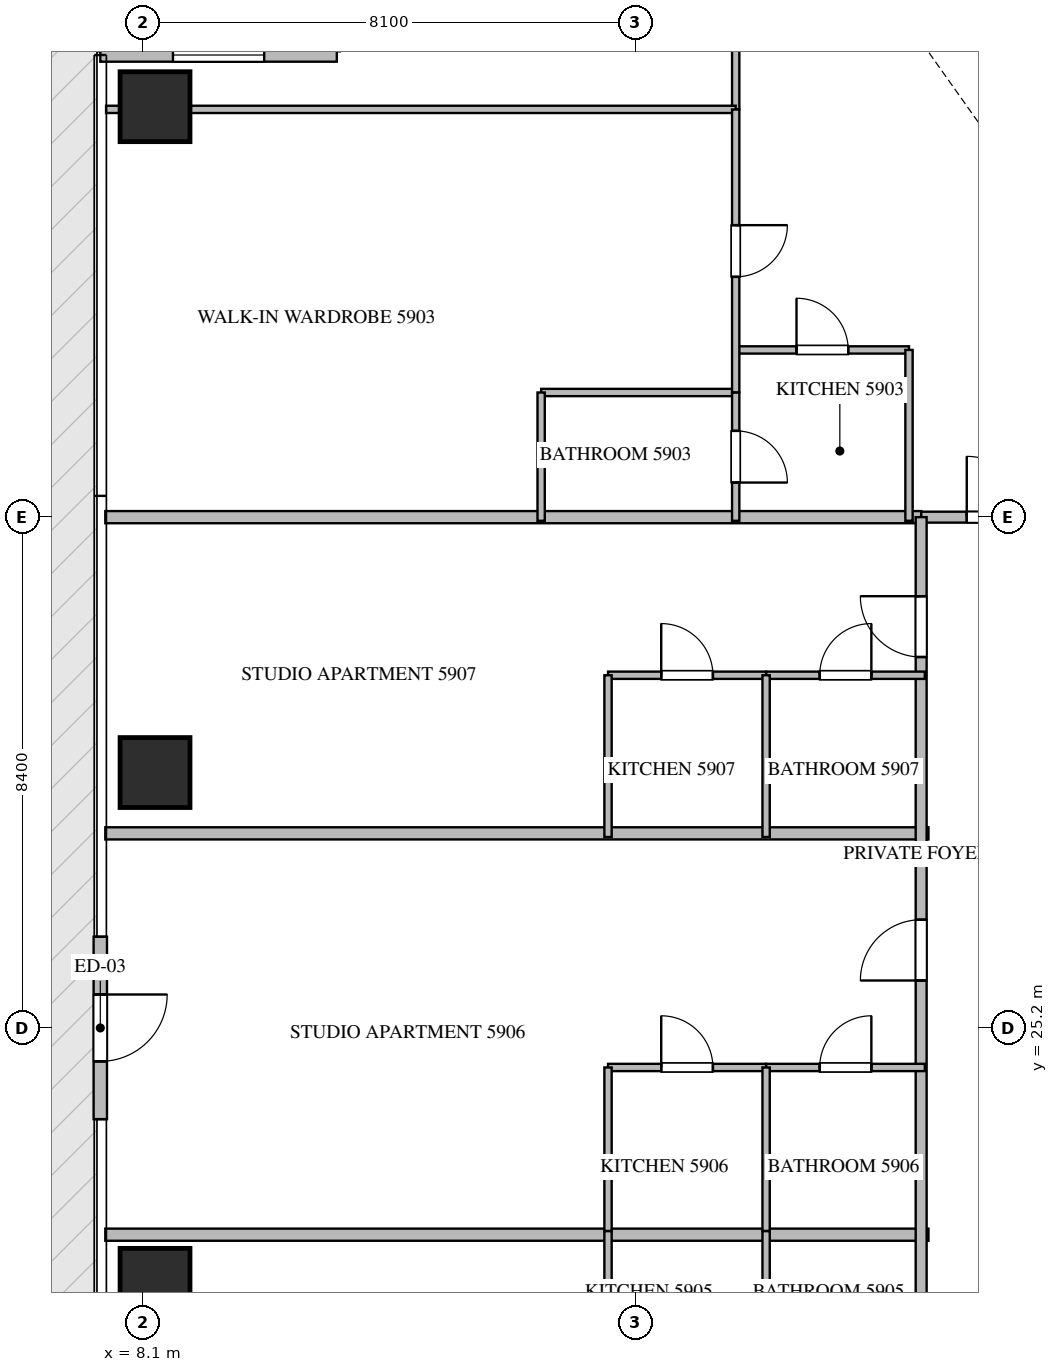
"""IFC4 building model, lengths in metres.
Left out: names, types, materials, properties, quantities, classifications, styles, units other than length and angle.
Written with IfcOpenShell. Run it as: python <this file> out.ifc"""

import sys

from ifc_helpers import new_model, si_unit, direction, frame, frame_2d, origin, origin_2d, place, context, subcontext, project, spatial, rectangle, extrude, source, transform, mapped, element, fill, save


model = new_model("IFC4")
c1 = context("Model", 3, precision=1e-05, world=origin(), true_north=direction((0.0, 1.0)))
c2 = subcontext(c1, "Body", "Model", "MODEL_VIEW")
j1 = project(units=[si_unit("LENGTHUNIT", "METRE"), si_unit("PLANEANGLEUNIT", "RADIAN")], contexts=[c1])
p1 = place(None, origin())
s1 = spatial("IfcSite", under=j1, at=p1, CompositionType="ELEMENT")
p2 = place(p1, origin())
s2 = spatial("IfcBuilding", under=s1, at=p2, CompositionType="ELEMENT")
p3 = place(p2, frame((0.0, 0.0, 237.4)))
s3 = spatial("IfcBuildingStorey", under=s2, at=p3, CompositionType="ELEMENT", Elevation=237.4)
m1 = source(origin(), c2, "Body", "SweptSolid", [
    extrude(rectangle(XDim=1.15, YDim=1.15, at=origin_2d()), origin(), (0.0, 0.0, 1.0), 3.85),
])
for number, where, z_axis, x_axis in (
    (1, (8.3, 21.0, -0.26), (0.0, 0.0, 1.0), (1.0, 0.0, 0.0)),
    (2, (8.3, 29.4, -0.26), (0.0, 0.0, 1.0), (1.0, 0.0, 0.0)),
    (3, (8.3, 40.35, -0.26), (0.0, 0.0, 1.0), (1.0, 0.0, 0.0)),
):
    element("IfcColumn", number, at=place(p3, frame(where, z_axis=z_axis, x_axis=x_axis)), inside=s3, PredefinedType="COLUMN", context=c2, shape_type="MappedRepresentation", body=[
        mapped(m1, transform((0.0, 0.0, 0.0), scale=1.0)),
    ])
p4 = place(p3, frame((11.29, 41.2, 0.0), z_axis=(0.0, 0.0, 1.0), x_axis=(-1.0, 0.0, 0.0)))
e4 = element("IfcWall", 4, at=p4, inside=s3, PredefinedType="ELEMENTEDWALL", context=c2, shape_type="SweptSolid", body=[
    extrude(rectangle(XDim=3.89, YDim=0.22, at=frame_2d((1.945, 0.0))), origin(), (0.0, 0.0, 1.0), 3.575),
])
p5 = place(p4, frame((1.195, 0.0, 0.65)))
e5 = element("IfcOpeningElement", 5, at=p5, cuts=e4, PredefinedType="OPENING", context=c2, shape_type="SweptSolid", body=[
    extrude(rectangle(XDim=1.5, YDim=2.25, at=frame_2d((0.75, 1.125))), frame((0.0, 0.12, 0.0), z_axis=(0.0, -1.0, 0.0), x_axis=(1.0, 0.0, 0.0)), (0.0, 0.0, 1.0), 0.24),
])
p6 = place(p3, frame((7.4, 26.7, 0.0), z_axis=(0.0, 0.0, 1.0), x_axis=(0.0, -1.0, 0.0)))
e6 = element("IfcWall", 6, at=p6, inside=s3, PredefinedType="ELEMENTEDWALL", context=c2, shape_type="SweptSolid", body=[
    extrude(rectangle(XDim=3.0, YDim=0.22, at=frame_2d((1.5, 0.0))), origin(), (0.0, 0.0, 1.0), 3.575),
])
p7 = place(p6, frame((0.95, 0.0, 0.0)))
e7 = element("IfcOpeningElement", 7, at=p7, cuts=e6, PredefinedType="OPENING", context=c2, shape_type="SweptSolid", body=[
    extrude(rectangle(XDim=1.1, YDim=2.2, at=frame_2d((0.55, 1.1))), frame((0.0, 0.12, 0.0), z_axis=(0.0, -1.0, 0.0), x_axis=(1.0, 0.0, 0.0)), (0.0, 0.0, 1.0), 0.24),
])
for number, where, z_axis, x_axis in (
    (8, (7.482, 21.8, 0.0), (0.0, 0.0, 1.0), (1.0, 0.0, 0.0)),
    (9, (7.482, 28.4, 0.0), (0.0, 0.0, 1.0), (1.0, 0.0, 0.0)),
):
    element("IfcWall", number, at=place(p3, frame(where, z_axis=z_axis, x_axis=x_axis)), inside=s3, PredefinedType="PARTITIONING", context=c2, shape_type="SweptSolid", body=[
        extrude(rectangle(XDim=13.538, YDim=0.2, at=frame_2d((6.769, 0.0))), origin(), (0.0, 0.0, 1.0), 3.59),
    ])
p8 = place(p3, frame((7.482, 33.6, 0.0), z_axis=(0.0, 0.0, 1.0), x_axis=(1.0, 0.0, 0.0)))
e10 = element("IfcWall", 10, at=p8, inside=s3, PredefinedType="PARTITIONING", context=c2, shape_type="SweptSolid", body=[
    extrude(rectangle(XDim=13.418, YDim=0.2, at=frame_2d((6.709, 0.0))), origin(), (0.0, 0.0, 1.0), 3.59),
])
p9 = place(p3, frame((20.902, 33.6, 0.0), z_axis=(0.0, 0.0, 1.0), x_axis=(1.0, 0.0, 0.0)))
e11 = element("IfcWall", 11, at=p9, inside=s3, PredefinedType="PARTITIONING", context=c2, shape_type="SweptSolid", body=[
    extrude(rectangle(XDim=2.496, YDim=0.18, at=frame_2d((1.248, 0.0))), origin(), (0.0, 0.0, 1.0), 3.59),
])
p10 = place(p9, frame((0.748, 0.0, 0.0)))
e12 = element("IfcOpeningElement", 12, at=p10, cuts=e11, PredefinedType="OPENING", context=c2, shape_type="SweptSolid", body=[
    extrude(rectangle(XDim=1.0, YDim=2.15, at=frame_2d((0.5, 1.075))), frame((0.0, 0.1, 0.0), z_axis=(0.0, -1.0, 0.0), x_axis=(1.0, 0.0, 0.0)), (0.0, 0.0, 1.0), 0.2),
])
p11 = place(p3, frame((20.9, 16.8, 0.0), z_axis=(0.0, 0.0, 1.0), x_axis=(0.0, 1.0, 0.0)))
e13 = element("IfcWall", 13, at=p11, inside=s3, PredefinedType="PARTITIONING", context=c2, shape_type="SweptSolid", body=[
    extrude(rectangle(XDim=16.8, YDim=0.18, at=frame_2d((8.4, 0.0))), origin(), (0.0, 0.0, 1.0), 3.59),
])
p12 = place(p11, frame((1.3, 0.0, 0.0)))
e14 = element("IfcOpeningElement", 14, at=p12, cuts=e13, PredefinedType="OPENING", context=c2, shape_type="SweptSolid", body=[
    extrude(rectangle(XDim=1.0, YDim=2.15, at=frame_2d((0.5, 1.075))), frame((0.0, 0.1, 0.0), z_axis=(0.0, -1.0, 0.0), x_axis=(1.0, 0.0, 0.0)), (0.0, 0.0, 1.0), 0.2),
])
p13 = place(p11, frame((9.18, 0.0, 0.0)))
e15 = element("IfcOpeningElement", 15, at=p13, cuts=e13, PredefinedType="OPENING", context=c2, shape_type="SweptSolid", body=[
    extrude(rectangle(XDim=1.0, YDim=2.15, at=frame_2d((0.5, 1.075))), frame((0.0, 0.1, 0.0), z_axis=(0.0, -1.0, 0.0), x_axis=(1.0, 0.0, 0.0)), (0.0, 0.0, 1.0), 0.2),
])
p14 = place(p11, frame((14.5, 0.0, 0.0)))
e16 = element("IfcOpeningElement", 16, at=p14, cuts=e13, PredefinedType="OPENING", context=c2, shape_type="SweptSolid", body=[
    extrude(rectangle(XDim=1.0, YDim=2.15, at=frame_2d((0.5, 1.075))), frame((0.0, 0.1, 0.0), z_axis=(0.0, -1.0, 0.0), x_axis=(1.0, 0.0, 0.0)), (0.0, 0.0, 1.0), 0.2),
])
p15 = place(p3, frame((17.85, 36.35, 0.0), z_axis=(0.0, 0.0, 1.0), x_axis=(1.0, 0.0, 0.0)))
e17 = element("IfcWall", 17, at=p15, inside=s3, PredefinedType="PARTITIONING", context=c2, shape_type="SweptSolid", body=[
    extrude(rectangle(XDim=2.85, YDim=0.12, at=frame_2d((1.425, 0.0))), origin(), (0.0, 0.0, 1.0), 3.59),
])
p16 = place(p15, frame((1.0, 0.0, 0.0)))
e18 = element("IfcOpeningElement", 18, at=p16, cuts=e17, PredefinedType="OPENING", context=c2, shape_type="SweptSolid", body=[
    extrude(rectangle(XDim=0.85, YDim=2.1, at=frame_2d((0.425, 1.05))), frame((0.0, 0.07, 0.0), z_axis=(0.0, -1.0, 0.0), x_axis=(1.0, 0.0, 0.0)), (0.0, 0.0, 1.0), 0.14),
])
p17 = place(p3, frame((20.7, 36.35, 0.0), z_axis=(0.0, 0.0, 1.0), x_axis=(0.0, -1.0, 0.0)))
e19 = element("IfcWall", 19, at=p17, inside=s3, PredefinedType="PARTITIONING", context=c2, shape_type="SweptSolid", body=[
    extrude(rectangle(XDim=2.81, YDim=0.12, at=frame_2d((1.405, 0.0))), origin(), (0.0, 0.0, 1.0), 3.59),
])
p18 = place(p3, frame((17.85, 49.105, 0.0), z_axis=(0.0, 0.0, 1.0), x_axis=(0.0, -1.0, 0.0)))
e20 = element("IfcWall", 20, at=p18, inside=s3, PredefinedType="PARTITIONING", context=c2, shape_type="SweptSolid", body=[
    extrude(rectangle(XDim=8.799, YDim=0.12, at=frame_2d((4.399, 0.0))), origin(), (0.0, 0.0, 1.0), 3.59),
])
p19 = place(p18, frame((4.344, 0.0, 0.0)))
e21 = element("IfcOpeningElement", 21, at=p19, cuts=e20, PredefinedType="OPENING", context=c2, shape_type="SweptSolid", body=[
    extrude(rectangle(XDim=0.9, YDim=2.1, at=frame_2d((0.45, 1.05))), frame((0.0, 0.07, 0.0), z_axis=(0.0, -1.0, 0.0), x_axis=(1.0, 0.0, 0.0)), (0.0, 0.0, 1.0), 0.14),
])
p20 = place(p3, frame((7.495, 40.306, 0.0), z_axis=(0.0, 0.0, 1.0), x_axis=(1.0, 0.0, 0.0)))
e22 = element("IfcWall", 22, at=p20, inside=s3, PredefinedType="PARTITIONING", context=c2, shape_type="SweptSolid", body=[
    extrude(rectangle(XDim=10.355, YDim=0.12, at=frame_2d((5.177, 0.0))), origin(), (0.0, 0.0, 1.0), 3.122),
])
p21 = place(p3, frame((14.65, 35.65, 0.0), z_axis=(0.0, 0.0, 1.0), x_axis=(1.0, 0.0, 0.0)))
e23 = element("IfcWall", 23, at=p21, inside=s3, PredefinedType="PARTITIONING", context=c2, shape_type="SweptSolid", body=[
    extrude(rectangle(XDim=3.2, YDim=0.12, at=frame_2d((1.6, 0.0))), origin(), (0.0, 0.0, 1.0), 3.59),
])
p22 = place(p3, frame((14.65, 35.65, 0.0), z_axis=(0.0, 0.0, 1.0), x_axis=(0.0, -1.0, 0.0)))
e24 = element("IfcWall", 24, at=p22, inside=s3, PredefinedType="PARTITIONING", context=c2, shape_type="SweptSolid", body=[
    extrude(rectangle(XDim=2.11, YDim=0.12, at=frame_2d((1.055, 0.0))), origin(), (0.0, 0.0, 1.0), 3.59),
])
p23 = place(p3, frame((17.85, 40.304, 0.0), z_axis=(0.0, 0.0, 1.0), x_axis=(0.0, -1.0, 0.0)))
e25 = element("IfcWall", 25, at=p23, inside=s3, PredefinedType="PARTITIONING", context=c2, shape_type="SweptSolid", body=[
    extrude(rectangle(XDim=4.654, YDim=0.12, at=frame_2d((2.327, 0.0))), origin(), (0.0, 0.0, 1.0), 3.59),
])
p24 = place(p23, frame((1.902, 0.0, 0.0)))
e26 = element("IfcOpeningElement", 26, at=p24, cuts=e25, PredefinedType="OPENING", context=c2, shape_type="SweptSolid", body=[
    extrude(rectangle(XDim=0.85, YDim=2.1, at=frame_2d((0.425, 1.05))), frame((0.0, 0.07, 0.0), z_axis=(0.0, -1.0, 0.0), x_axis=(1.0, 0.0, 0.0)), (0.0, 0.0, 1.0), 0.14),
])
p25 = place(p3, frame((17.85, 35.648, 0.0), z_axis=(0.0, 0.0, 1.0), x_axis=(0.0, -1.0, 0.0)))
e27 = element("IfcWall", 27, at=p25, inside=s3, PredefinedType="PARTITIONING", context=c2, shape_type="SweptSolid", body=[
    extrude(rectangle(XDim=2.108, YDim=0.12, at=frame_2d((1.054, 0.0))), origin(), (0.0, 0.0, 1.0), 3.59),
])
p26 = place(p25, frame((0.629, 0.0, 0.0)))
e28 = element("IfcOpeningElement", 28, at=p26, cuts=e27, PredefinedType="OPENING", context=c2, shape_type="SweptSolid", body=[
    extrude(rectangle(XDim=0.85, YDim=2.1, at=frame_2d((0.425, 1.05))), frame((0.0, 0.07, 0.0), z_axis=(0.0, -1.0, 0.0), x_axis=(1.0, 0.0, 0.0)), (0.0, 0.0, 1.0), 0.14),
])
for number, where, z_axis, x_axis in (
    (29, (18.35, 19.4, 0.0), (0.0, 0.0, 1.0), (0.0, 1.0, 0.0)),
    (30, (15.75, 19.4, 0.0), (0.0, 0.0, 1.0), (0.0, 1.0, 0.0)),
):
    element("IfcWall", number, at=place(p3, frame(where, z_axis=z_axis, x_axis=x_axis)), inside=s3, PredefinedType="PARTITIONING", context=c2, shape_type="SweptSolid", body=[
        extrude(rectangle(XDim=2.46, YDim=0.12, at=frame_2d((1.23, 0.0))), origin(), (0.0, 0.0, 1.0), 3.59),
    ])
p27 = place(p3, frame((15.75, 24.55, 0.0), z_axis=(0.0, 0.0, 1.0), x_axis=(1.0, 0.0, 0.0)))
e31 = element("IfcWall", 31, at=p27, inside=s3, PredefinedType="PARTITIONING", context=c2, shape_type="SweptSolid", body=[
    extrude(rectangle(XDim=2.6, YDim=0.12, at=frame_2d((1.3, 0.0))), origin(), (0.0, 0.0, 1.0), 3.59),
])
p28 = place(p27, frame((0.875, 0.0, 0.0)))
e32 = element("IfcOpeningElement", 32, at=p28, cuts=e31, PredefinedType="OPENING", context=c2, shape_type="SweptSolid", body=[
    extrude(rectangle(XDim=0.85, YDim=2.1, at=frame_2d((0.425, 1.05))), frame((0.0, 0.07, 0.0), z_axis=(0.0, -1.0, 0.0), x_axis=(1.0, 0.0, 0.0)), (0.0, 0.0, 1.0), 0.14),
])
p29 = place(p3, frame((18.352, 24.55, 0.0), z_axis=(0.0, 0.0, 1.0), x_axis=(1.0, 0.0, 0.0)))
e33 = element("IfcWall", 33, at=p29, inside=s3, PredefinedType="PARTITIONING", context=c2, shape_type="SweptSolid", body=[
    extrude(rectangle(XDim=2.608, YDim=0.12, at=frame_2d((1.304, 0.0))), origin(), (0.0, 0.0, 1.0), 3.59),
])
p30 = place(p29, frame((0.879, 0.0, 0.0)))
e34 = element("IfcOpeningElement", 34, at=p30, cuts=e33, PredefinedType="OPENING", context=c2, shape_type="SweptSolid", body=[
    extrude(rectangle(XDim=0.85, YDim=2.1, at=frame_2d((0.425, 1.05))), frame((0.0, 0.07, 0.0), z_axis=(0.0, -1.0, 0.0), x_axis=(1.0, 0.0, 0.0)), (0.0, 0.0, 1.0), 0.14),
])
for number, where, z_axis, x_axis in (
    (35, (18.35, 21.862, 0.0), (0.0, 0.0, 1.0), (0.0, 1.0, 0.0)),
    (36, (15.75, 21.862, 0.0), (0.0, 0.0, 1.0), (0.0, 1.0, 0.0)),
):
    element("IfcWall", number, at=place(p3, frame(where, z_axis=z_axis, x_axis=x_axis)), inside=s3, PredefinedType="PARTITIONING", context=c2, shape_type="SweptSolid", body=[
        extrude(rectangle(XDim=2.688, YDim=0.12, at=frame_2d((1.344, 0.0))), origin(), (0.0, 0.0, 1.0), 3.59),
    ])
p31 = place(p3, frame((15.75, 31.0, 0.0), z_axis=(0.0, 0.0, 1.0), x_axis=(1.0, 0.0, 0.0)))
e37 = element("IfcWall", 37, at=p31, inside=s3, PredefinedType="PARTITIONING", context=c2, shape_type="SweptSolid", body=[
    extrude(rectangle(XDim=2.6, YDim=0.12, at=frame_2d((1.3, 0.0))), origin(), (0.0, 0.0, 1.0), 3.59),
])
p32 = place(p31, frame((0.875, 0.0, 0.0)))
e38 = element("IfcOpeningElement", 38, at=p32, cuts=e37, PredefinedType="OPENING", context=c2, shape_type="SweptSolid", body=[
    extrude(rectangle(XDim=0.85, YDim=2.1, at=frame_2d((0.425, 1.05))), frame((0.0, 0.07, 0.0), z_axis=(0.0, -1.0, 0.0), x_axis=(1.0, 0.0, 0.0)), (0.0, 0.0, 1.0), 0.14),
])
p33 = place(p3, frame((18.352, 31.0, 0.0), z_axis=(0.0, 0.0, 1.0), x_axis=(1.0, 0.0, 0.0)))
e39 = element("IfcWall", 39, at=p33, inside=s3, PredefinedType="PARTITIONING", context=c2, shape_type="SweptSolid", body=[
    extrude(rectangle(XDim=2.608, YDim=0.12, at=frame_2d((1.304, 0.0))), origin(), (0.0, 0.0, 1.0), 3.59),
])
p34 = place(p33, frame((0.879, 0.0, 0.0)))
e40 = element("IfcOpeningElement", 40, at=p34, cuts=e39, PredefinedType="OPENING", context=c2, shape_type="SweptSolid", body=[
    extrude(rectangle(XDim=0.85, YDim=2.1, at=frame_2d((0.425, 1.05))), frame((0.0, 0.07, 0.0), z_axis=(0.0, -1.0, 0.0), x_axis=(1.0, 0.0, 0.0)), (0.0, 0.0, 1.0), 0.14),
])
for number, where, z_axis, x_axis in (
    (41, (18.35, 28.34, 0.0), (0.0, 0.0, 1.0), (0.0, 1.0, 0.0)),
    (42, (15.75, 28.34, 0.0), (0.0, 0.0, 1.0), (0.0, 1.0, 0.0)),
):
    element("IfcWall", number, at=place(p3, frame(where, z_axis=z_axis, x_axis=x_axis)), inside=s3, PredefinedType="PARTITIONING", context=c2, shape_type="SweptSolid", body=[
        extrude(rectangle(XDim=2.66, YDim=0.12, at=frame_2d((1.33, 0.0))), origin(), (0.0, 0.0, 1.0), 3.59),
    ])
m2 = source(origin(), c2, "Body", "SweptSolid", [
    extrude(rectangle(XDim=1.5, YDim=2.25, at=frame_2d((0.75, 1.125))), frame((0.0, 0.03, 0.0), z_axis=(0.0, -1.0, 0.0), x_axis=(1.0, 0.0, 0.0)), (0.0, 0.0, 1.0), 0.06),
])
p35 = place(p5, origin())
e43 = element("IfcWindow", 43, at=p35, inside=s3, PartitioningType="SINGLE_PANEL", PredefinedType="WINDOW", context=c2, shape_type="MappedRepresentation", body=[
    mapped(m2, transform((0.0, 0.0, 0.0), scale=1.0)),
])
fill(e5, e43)
m3 = source(origin(), c2, "Body", "SweptSolid", [
    extrude(rectangle(XDim=1.1, YDim=2.2, at=frame_2d((0.55, 1.1))), frame((0.0, 0.025, 0.0), z_axis=(0.0, -1.0, 0.0), x_axis=(1.0, 0.0, 0.0)), (0.0, 0.0, 1.0), 0.05),
])
p36 = place(p7, origin())
e44 = element("IfcDoor", 44, at=p36, inside=s3, OperationType="SINGLE_SWING_LEFT", PredefinedType="DOOR", context=c2, shape_type="MappedRepresentation", body=[
    mapped(m3, transform((0.0, 0.0, 0.0), scale=1.0)),
])
fill(e7, e44)
m4 = source(origin(), c2, "Body", "SweptSolid", [
    extrude(rectangle(XDim=1.0, YDim=2.15, at=frame_2d((0.5, 1.075))), frame((0.0, 0.025, 0.0), z_axis=(0.0, -1.0, 0.0), x_axis=(1.0, 0.0, 0.0)), (0.0, 0.0, 1.0), 0.05),
])
p37 = place(p10, origin())
e45 = element("IfcDoor", 45, at=p37, inside=s3, OperationType="SINGLE_SWING_LEFT", PredefinedType="DOOR", context=c2, shape_type="MappedRepresentation", body=[
    mapped(m4, transform((0.0, 0.0, 0.0), scale=1.0)),
])
fill(e12, e45)
p38 = place(p13, origin())
e46 = element("IfcDoor", 46, at=p38, inside=s3, OperationType="SINGLE_SWING_LEFT", PredefinedType="DOOR", context=c2, shape_type="MappedRepresentation", body=[
    mapped(m4, transform((0.0, 0.0, 0.0), scale=1.0)),
])
fill(e15, e46)
p39 = place(p14, origin())
e47 = element("IfcDoor", 47, at=p39, inside=s3, OperationType="SINGLE_SWING_RIGHT", PredefinedType="DOOR", context=c2, shape_type="MappedRepresentation", body=[
    mapped(m4, transform((0.0, 0.0, 0.0), scale=1.0)),
])
fill(e16, e47)
m5 = source(origin(), c2, "Body", "SweptSolid", [
    extrude(rectangle(XDim=0.85, YDim=2.1, at=frame_2d((0.425, 1.05))), frame((0.0, 0.025, 0.0), z_axis=(0.0, -1.0, 0.0), x_axis=(1.0, 0.0, 0.0)), (0.0, 0.0, 1.0), 0.05),
])
p40 = place(p16, origin())
e48 = element("IfcDoor", 48, at=p40, inside=s3, OperationType="SINGLE_SWING_LEFT", PredefinedType="DOOR", context=c2, shape_type="MappedRepresentation", body=[
    mapped(m5, transform((0.0, 0.0, 0.0), scale=1.0)),
])
fill(e18, e48)
p41 = place(p24, origin())
e49 = element("IfcDoor", 49, at=p41, inside=s3, OperationType="SINGLE_SWING_LEFT", PredefinedType="DOOR", context=c2, shape_type="MappedRepresentation", body=[
    mapped(m5, transform((0.0, 0.0, 0.0), scale=1.0)),
])
fill(e26, e49)
p42 = place(p26, origin())
e50 = element("IfcDoor", 50, at=p42, inside=s3, OperationType="SINGLE_SWING_RIGHT", PredefinedType="DOOR", context=c2, shape_type="MappedRepresentation", body=[
    mapped(m5, transform((0.0, 0.0, 0.0), scale=1.0)),
])
fill(e28, e50)
p43 = place(p28, origin())
e51 = element("IfcDoor", 51, at=p43, inside=s3, OperationType="SINGLE_SWING_LEFT", PredefinedType="DOOR", context=c2, shape_type="MappedRepresentation", body=[
    mapped(m5, transform((0.0, 0.0, 0.0), scale=1.0)),
])
fill(e32, e51)
p44 = place(p30, origin())
e52 = element("IfcDoor", 52, at=p44, inside=s3, OperationType="SINGLE_SWING_RIGHT", PredefinedType="DOOR", context=c2, shape_type="MappedRepresentation", body=[
    mapped(m5, transform((0.0, 0.0, 0.0), scale=1.0)),
])
fill(e34, e52)
p45 = place(p32, origin())
e53 = element("IfcDoor", 53, at=p45, inside=s3, OperationType="SINGLE_SWING_LEFT", PredefinedType="DOOR", context=c2, shape_type="MappedRepresentation", body=[
    mapped(m5, transform((0.0, 0.0, 0.0), scale=1.0)),
])
fill(e38, e53)
p46 = place(p34, origin())
e54 = element("IfcDoor", 54, at=p46, inside=s3, OperationType="SINGLE_SWING_RIGHT", PredefinedType="DOOR", context=c2, shape_type="MappedRepresentation", body=[
    mapped(m5, transform((0.0, 0.0, 0.0), scale=1.0)),
])
fill(e40, e54)
save(model, sys.argv[1])
